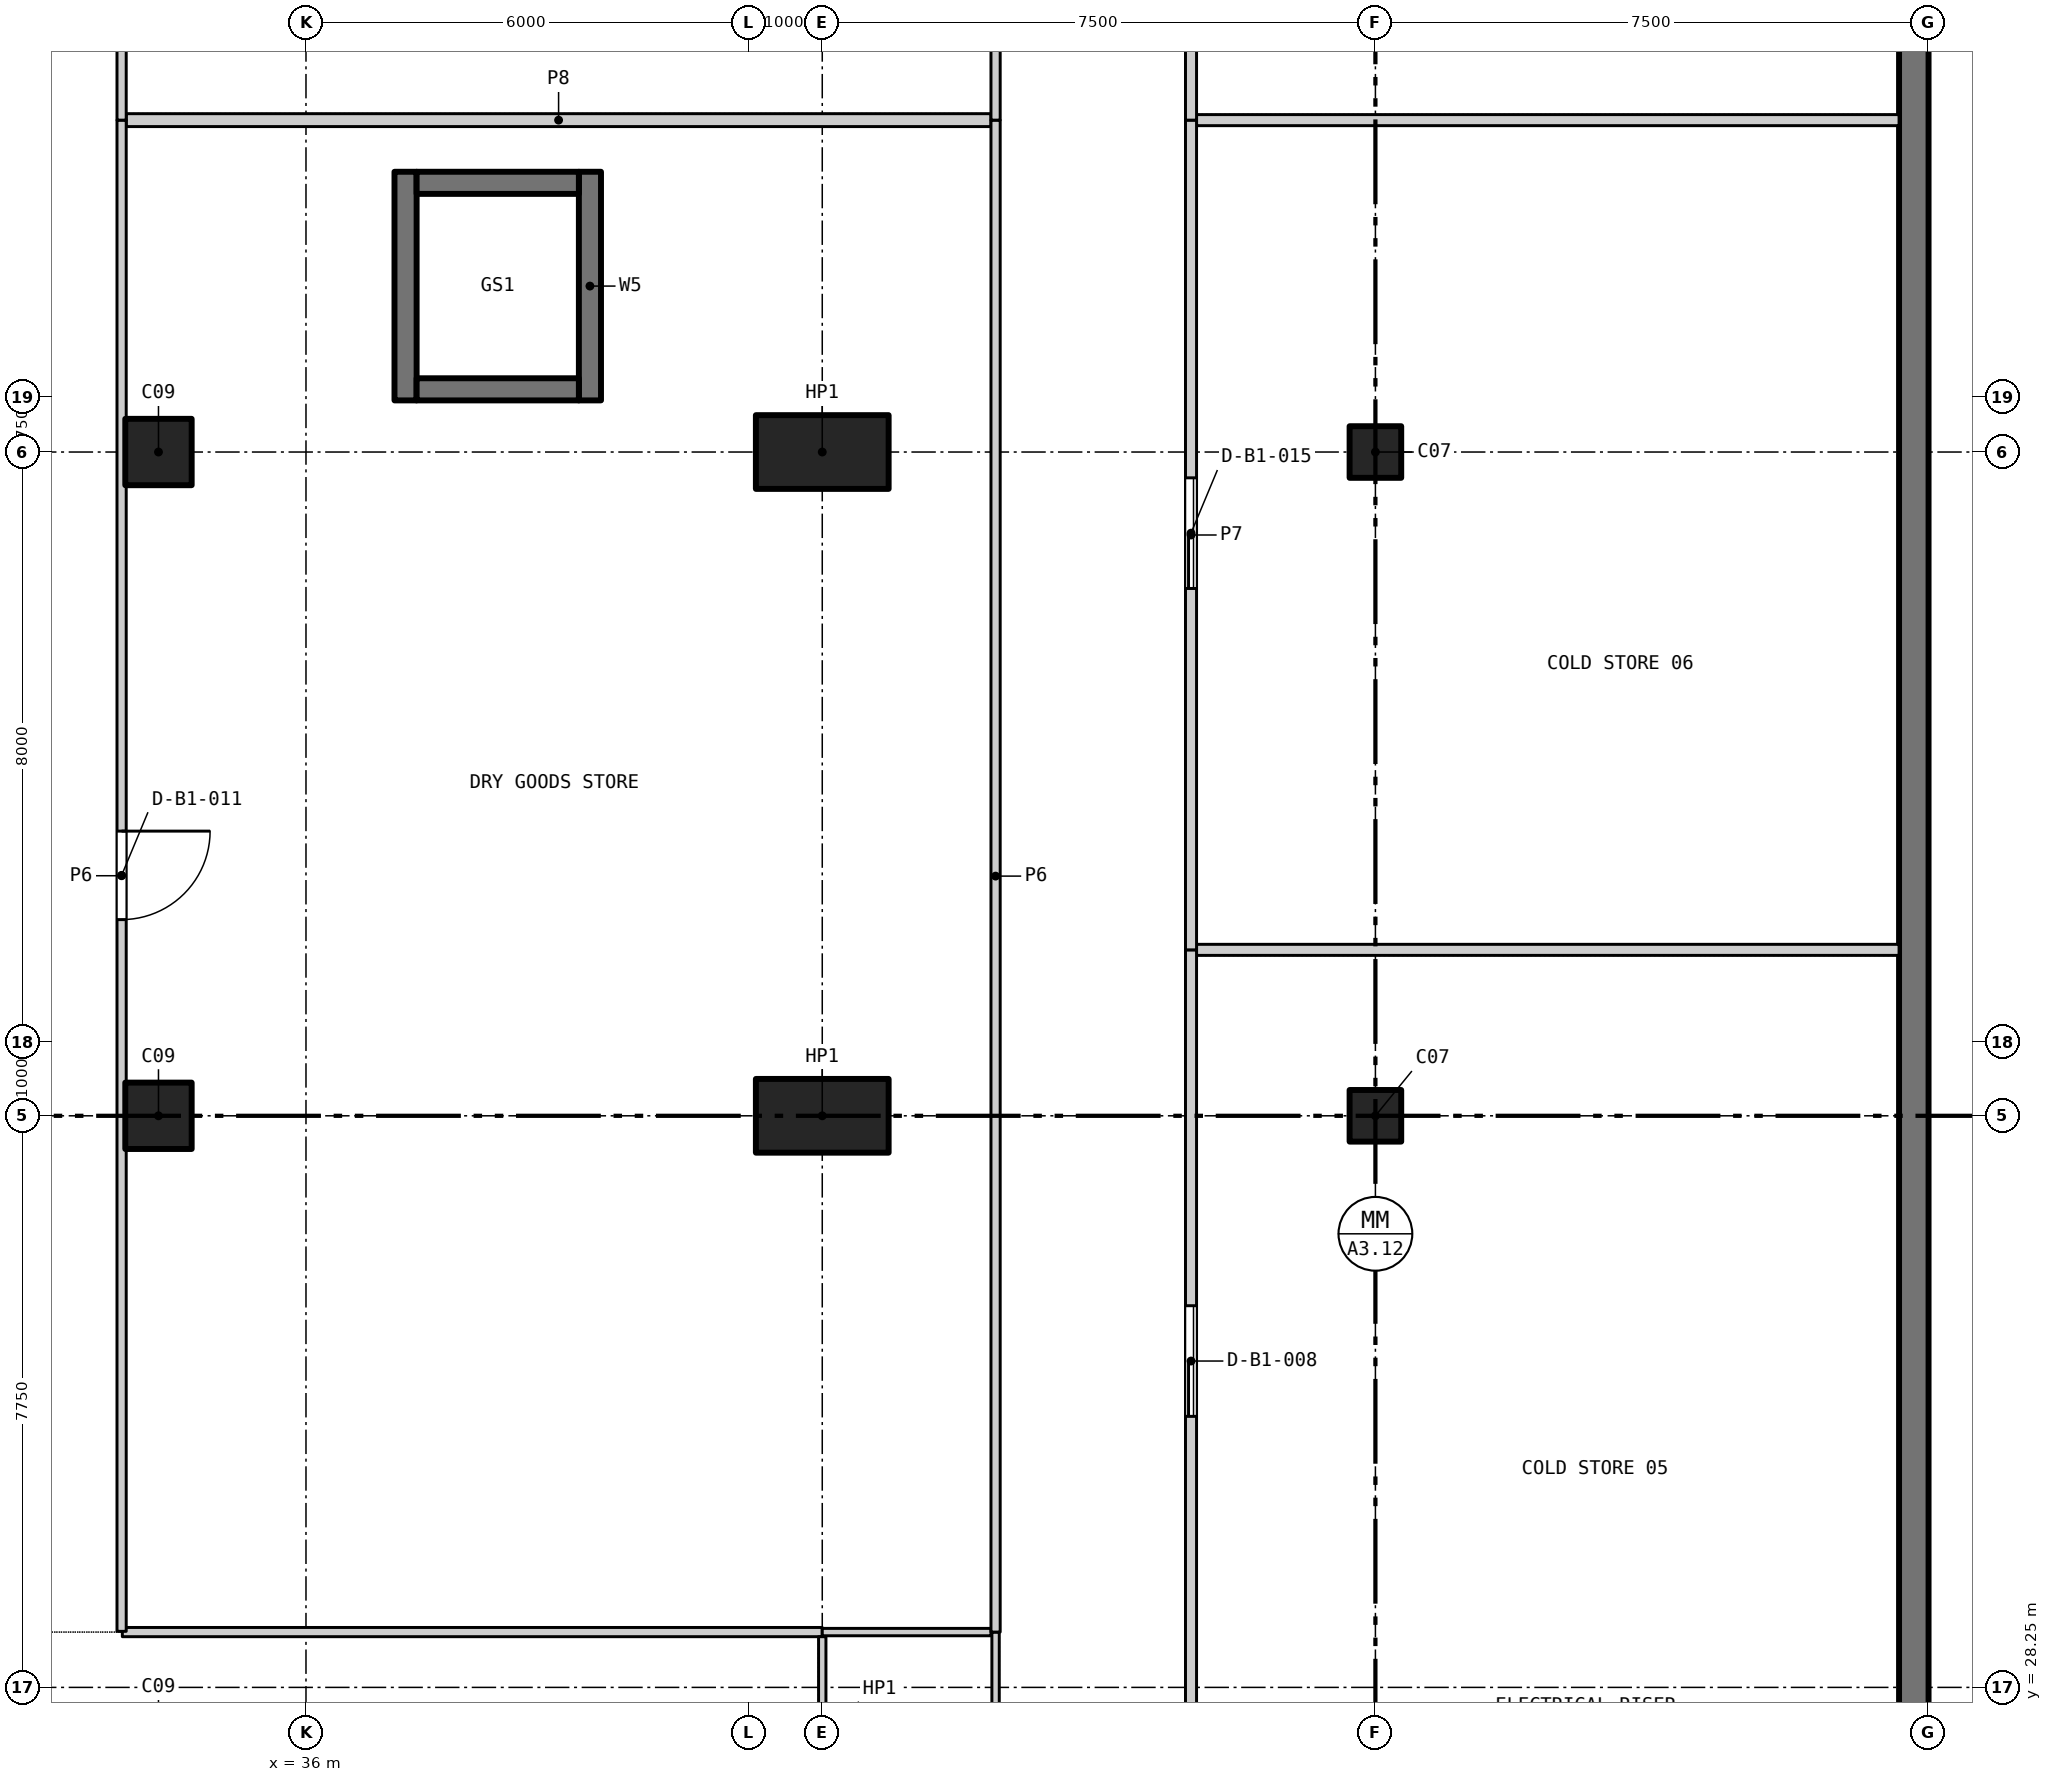
"""IFC4 building model, lengths in metres.
Left out: names, types, materials, properties, quantities, classifications, styles, units other than length and angle.
Written with IfcOpenShell. Run it as: python <this file> out.ifc"""

import sys

from ifc_helpers import new_model, si_unit, direction, frame, frame_2d, origin, origin_2d, place, context, subcontext, project, spatial, rectangle, extrude, element, fill, save


model = new_model("IFC4")
c1 = context("Model", 3, precision=1e-05, world=origin(), true_north=direction((0.0, 1.0)))
c2 = subcontext(c1, "Body", "Model", "MODEL_VIEW")
j1 = project(units=[si_unit("LENGTHUNIT", "METRE"), si_unit("PLANEANGLEUNIT", "RADIAN")], contexts=[c1])
p1 = place(None, origin())
s1 = spatial("IfcSite", under=j1, at=p1, CompositionType="ELEMENT")
p2 = place(p1, origin())
s2 = spatial("IfcBuilding", under=s1, at=p2, CompositionType="ELEMENT")
p3 = place(p2, frame((0.0, 0.0, -10.0)))
s3 = spatial("IfcBuildingStorey", under=s2, at=p3, CompositionType="ELEMENT", Elevation=-10.0)
for number, where, z_axis, x_axis in (
    (1, (34.0, 36.0, -1.4), (0.0, 0.0, 1.0), (1.0, 0.0, 0.0)),
    (2, (34.0, 45.0, -1.4), (0.0, 0.0, 1.0), (1.0, 0.0, 0.0)),
):
    element("IfcColumn", number, at=place(p3, frame(where, z_axis=z_axis, x_axis=x_axis)), inside=s3, PredefinedType="COLUMN", context=c2, shape_type="SweptSolid", body=[
        extrude(rectangle(XDim=0.9, YDim=0.9, at=origin_2d()), origin(), (0.0, 0.0, 1.0), 6.4),
    ])
for number, where, z_axis, x_axis in (
    (3, (50.5, 36.0, -1.4), (0.0, 0.0, 1.0), (1.0, 0.0, 0.0)),
    (4, (50.5, 45.0, -1.4), (0.0, 0.0, 1.0), (1.0, 0.0, 0.0)),
):
    element("IfcColumn", number, at=place(p3, frame(where, z_axis=z_axis, x_axis=x_axis)), inside=s3, PredefinedType="COLUMN", context=c2, shape_type="SweptSolid", body=[
        extrude(rectangle(XDim=0.7, YDim=0.7, at=origin_2d()), origin(), (0.0, 0.0, 1.0), 6.4),
    ])
p4 = place(p3, frame((57.8, 18.0, -1.4), z_axis=(0.0, 0.0, 1.0), x_axis=(0.0, 1.0, 0.0)))
e5 = element("IfcWall", 5, at=p4, inside=s3, PredefinedType="SOLIDWALL", context=c2, shape_type="SweptSolid", body=[
    extrude(rectangle(XDim=108.0, YDim=0.4, at=frame_2d((54.0, 0.0))), origin(), (0.0, 0.0, 1.0), 6.4),
])
for number, where, z_axis, x_axis in (
    (6, (37.35, 45.7, -1.4), (0.0, 0.0, 1.0), (0.0, 1.0, 0.0)),
    (7, (39.85, 45.7, -1.4), (0.0, 0.0, 1.0), (0.0, 1.0, 0.0)),
):
    element("IfcWall", number, at=place(p3, frame(where, z_axis=z_axis, x_axis=x_axis)), inside=s3, PredefinedType="SHEAR", context=c2, shape_type="SweptSolid", body=[
        extrude(rectangle(XDim=3.1, YDim=0.3, at=frame_2d((1.55, 0.0))), origin(), (0.0, 0.0, 1.0), 6.4),
    ])
for number, where, z_axis, x_axis in (
    (8, (37.5, 45.85, -1.4), (0.0, 0.0, 1.0), (1.0, 0.0, 0.0)),
    (9, (37.5, 48.65, -1.4), (0.0, 0.0, 1.0), (1.0, 0.0, 0.0)),
):
    element("IfcWall", number, at=place(p3, frame(where, z_axis=z_axis, x_axis=x_axis)), inside=s3, PredefinedType="SHEAR", context=c2, shape_type="SweptSolid", body=[
        extrude(rectangle(XDim=2.2, YDim=0.3, at=frame_2d((1.1, 0.0))), origin(), (0.0, 0.0, 1.0), 6.4),
    ])
for number, where, z_axis, x_axis in (
    (10, (43.0, 36.0, -1.4), (0.0, 0.0, 1.0), (1.0, 0.0, 0.0)),
    (11, (43.0, 45.0, -1.4), (0.0, 0.0, 1.0), (1.0, 0.0, 0.0)),
):
    element("IfcColumn", number, at=place(p3, frame(where, z_axis=z_axis, x_axis=x_axis)), inside=s3, PredefinedType="COLUMN", context=c2, shape_type="SweptSolid", body=[
        extrude(rectangle(XDim=1.8, YDim=1.0, at=origin_2d()), origin(), (0.0, 0.0, 1.0), 6.4),
    ])
p5 = place(p3, frame((33.51, 29.0, 0.0), z_axis=(0.0, 0.0, 1.0), x_axis=(1.0, 0.0, 0.0)))
e12 = element("IfcWall", 12, at=p5, inside=s3, PredefinedType="PARTITIONING", context=c2, shape_type="SweptSolid", body=[
    extrude(rectangle(XDim=9.49, YDim=0.125, at=frame_2d((4.745, 0.0))), origin(), (0.0, 0.0, 1.0), 4.75),
])
p6 = place(p3, frame((43.0, 29.0, 0.0), z_axis=(0.0, 0.0, 1.0), x_axis=(1.0, 0.0, 0.0)))
e13 = element("IfcWall", 13, at=p6, inside=s3, PredefinedType="PARTITIONING", context=c2, shape_type="SweptSolid", body=[
    extrude(rectangle(XDim=2.288, YDim=0.1, at=frame_2d((1.144, 0.0))), origin(), (0.0, 0.0, 1.0), 4.75),
])
p7 = place(p3, frame((48.075, 38.25, 0.0), z_axis=(0.0, 0.0, 1.0), x_axis=(1.0, 0.0, 0.0)))
e14 = element("IfcWall", 14, at=p7, inside=s3, PredefinedType="PARTITIONING", context=c2, shape_type="SweptSolid", body=[
    extrude(rectangle(XDim=9.525, YDim=0.15, at=frame_2d((4.763, 0.0))), origin(), (0.0, 0.0, 1.0), 4.75),
])
p8 = place(p3, frame((33.562, 49.5, 0.0), z_axis=(0.0, 0.0, 1.0), x_axis=(1.0, 0.0, 0.0)))
e15 = element("IfcWall", 15, at=p8, inside=s3, PredefinedType="PARTITIONING", context=c2, shape_type="SweptSolid", body=[
    extrude(rectangle(XDim=11.725, YDim=0.175, at=frame_2d((5.863, 0.0))), origin(), (0.0, 0.0, 1.0), 4.75),
])
p9 = place(p3, frame((48.075, 49.5, 0.0), z_axis=(0.0, 0.0, 1.0), x_axis=(1.0, 0.0, 0.0)))
e16 = element("IfcWall", 16, at=p9, inside=s3, PredefinedType="PARTITIONING", context=c2, shape_type="SweptSolid", body=[
    extrude(rectangle(XDim=9.525, YDim=0.15, at=frame_2d((4.763, 0.0))), origin(), (0.0, 0.0, 1.0), 4.75),
])
p10 = place(p3, frame((33.5, 29.01, 0.0), z_axis=(0.0, 0.0, 1.0), x_axis=(0.0, 1.0, 0.0)))
e17 = element("IfcWall", 17, at=p10, inside=s3, PredefinedType="PARTITIONING", context=c2, shape_type="SweptSolid", body=[
    extrude(rectangle(XDim=20.49, YDim=0.125, at=frame_2d((10.245, 0.0))), origin(), (0.0, 0.0, 1.0), 4.75),
])
p11 = place(p10, frame((9.65, 0.0, 0.0)))
e18 = element("IfcOpeningElement", 18, at=p11, cuts=e17, PredefinedType="OPENING", context=c2, shape_type="SweptSolid", body=[
    extrude(rectangle(XDim=1.2, YDim=2.1, at=frame_2d((0.6, 1.05))), frame((0.0, 0.073, 0.0), z_axis=(0.0, -1.0, 0.0), x_axis=(1.0, 0.0, 0.0)), (0.0, 0.0, 1.0), 0.145),
])
p12 = place(p3, frame((33.5, 49.5, 0.0), z_axis=(0.0, 0.0, 1.0), x_axis=(0.0, 1.0, 0.0)))
e19 = element("IfcWall", 19, at=p12, inside=s3, PredefinedType="PARTITIONING", context=c2, shape_type="SweptSolid", body=[
    extrude(rectangle(XDim=18.0, YDim=0.125, at=frame_2d((9.0, 0.0))), origin(), (0.0, 0.0, 1.0), 4.75),
])
p13 = place(p12, frame((8.4, 0.0, 0.0)))
e20 = element("IfcOpeningElement", 20, at=p13, cuts=e19, PredefinedType="OPENING", context=c2, shape_type="SweptSolid", body=[
    extrude(rectangle(XDim=1.2, YDim=2.1, at=frame_2d((0.6, 1.05))), frame((0.0, 0.073, 0.0), z_axis=(0.0, -1.0, 0.0), x_axis=(1.0, 0.0, 0.0)), (0.0, 0.0, 1.0), 0.145),
])
p14 = place(p3, frame((43.0, 27.95, 0.0), z_axis=(0.0, 0.0, 1.0), x_axis=(0.0, 1.0, 0.0)))
e21 = element("IfcWall", 21, at=p14, inside=s3, PredefinedType="PARTITIONING", context=c2, shape_type="SweptSolid", body=[
    extrude(rectangle(XDim=0.988, YDim=0.1, at=frame_2d((0.494, 0.0))), origin(), (0.0, 0.0, 1.0), 4.75),
])
p15 = place(p3, frame((45.35, 27.05, 0.0), z_axis=(0.0, 0.0, 1.0), x_axis=(0.0, 1.0, 0.0)))
e22 = element("IfcWall", 22, at=p15, inside=s3, PredefinedType="PARTITIONING", context=c2, shape_type="SweptSolid", body=[
    extrude(rectangle(XDim=1.95, YDim=0.1, at=frame_2d((0.975, 0.0))), origin(), (0.0, 0.0, 1.0), 4.75),
])
p16 = place(p3, frame((45.35, 29.0, 0.0), z_axis=(0.0, 0.0, 1.0), x_axis=(0.0, 1.0, 0.0)))
e23 = element("IfcWall", 23, at=p16, inside=s3, PredefinedType="PARTITIONING", context=c2, shape_type="SweptSolid", body=[
    extrude(rectangle(XDim=20.5, YDim=0.125, at=frame_2d((10.25, 0.0))), origin(), (0.0, 0.0, 1.0), 4.75),
])
p17 = place(p3, frame((45.35, 49.5, 0.0), z_axis=(0.0, 0.0, 1.0), x_axis=(0.0, 1.0, 0.0)))
e24 = element("IfcWall", 24, at=p17, inside=s3, PredefinedType="PARTITIONING", context=c2, shape_type="SweptSolid", body=[
    extrude(rectangle(XDim=18.0, YDim=0.125, at=frame_2d((9.0, 0.0))), origin(), (0.0, 0.0, 1.0), 4.75),
])
p18 = place(p3, frame((48.0, 27.075, 0.0), z_axis=(0.0, 0.0, 1.0), x_axis=(0.0, 1.0, 0.0)))
e25 = element("IfcWall", 25, at=p18, inside=s3, PredefinedType="PARTITIONING", context=c2, shape_type="SweptSolid", body=[
    extrude(rectangle(XDim=11.175, YDim=0.15, at=frame_2d((5.587, 0.0))), origin(), (0.0, 0.0, 1.0), 4.75),
])
p19 = place(p18, frame((4.85, 0.0, 0.0)))
e26 = element("IfcOpeningElement", 26, at=p19, cuts=e25, PredefinedType="OPENING", context=c2, shape_type="SweptSolid", body=[
    extrude(rectangle(XDim=1.5, YDim=2.4, at=frame_2d((0.75, 1.2))), frame((0.0, 0.085, 0.0), z_axis=(0.0, -1.0, 0.0), x_axis=(1.0, 0.0, 0.0)), (0.0, 0.0, 1.0), 0.17),
])
p20 = place(p3, frame((48.0, 38.25, 0.0), z_axis=(0.0, 0.0, 1.0), x_axis=(0.0, 1.0, 0.0)))
e27 = element("IfcWall", 27, at=p20, inside=s3, PredefinedType="PARTITIONING", context=c2, shape_type="SweptSolid", body=[
    extrude(rectangle(XDim=11.25, YDim=0.15, at=frame_2d((5.625, 0.0))), origin(), (0.0, 0.0, 1.0), 4.75),
])
p21 = place(p20, frame((4.9, 0.0, 0.0)))
e28 = element("IfcOpeningElement", 28, at=p21, cuts=e27, PredefinedType="OPENING", context=c2, shape_type="SweptSolid", body=[
    extrude(rectangle(XDim=1.5, YDim=2.4, at=frame_2d((0.75, 1.2))), frame((0.0, 0.085, 0.0), z_axis=(0.0, -1.0, 0.0), x_axis=(1.0, 0.0, 0.0)), (0.0, 0.0, 1.0), 0.17),
])
p22 = place(p3, frame((48.0, 49.5, 0.0), z_axis=(0.0, 0.0, 1.0), x_axis=(0.0, 1.0, 0.0)))
e29 = element("IfcWall", 29, at=p22, inside=s3, PredefinedType="PARTITIONING", context=c2, shape_type="SweptSolid", body=[
    extrude(rectangle(XDim=11.25, YDim=0.15, at=frame_2d((5.625, 0.0))), origin(), (0.0, 0.0, 1.0), 4.75),
])
p23 = place(p22, frame((4.9, 0.0, 0.0)))
e30 = element("IfcOpeningElement", 30, at=p23, cuts=e29, PredefinedType="OPENING", context=c2, shape_type="SweptSolid", body=[
    extrude(rectangle(XDim=1.5, YDim=2.4, at=frame_2d((0.75, 1.2))), frame((0.0, 0.085, 0.0), z_axis=(0.0, -1.0, 0.0), x_axis=(1.0, 0.0, 0.0)), (0.0, 0.0, 1.0), 0.17),
])
p24 = place(p19, origin())
e31 = element("IfcDoor", 31, at=p24, inside=s3, OperationType="SLIDING_TO_LEFT", PredefinedType="DOOR", context=c2, shape_type="SweptSolid", body=[
    extrude(rectangle(XDim=1.5, YDim=2.4, at=frame_2d((0.75, 1.2))), frame((0.0, 0.025, 0.0), z_axis=(0.0, -1.0, 0.0), x_axis=(1.0, 0.0, 0.0)), (0.0, 0.0, 1.0), 0.05),
])
fill(e26, e31)
p25 = place(p11, frame((1.2, 0.0, 0.0), z_axis=(0.0, 0.0, 1.0), x_axis=(-1.0, 0.0, 0.0)))
e32 = element("IfcDoor", 32, at=p25, inside=s3, OperationType="SINGLE_SWING_LEFT", PredefinedType="DOOR", context=c2, shape_type="SweptSolid", body=[
    extrude(rectangle(XDim=1.2, YDim=2.1, at=frame_2d((0.6, 1.05))), frame((0.0, 0.025, 0.0), z_axis=(0.0, -1.0, 0.0), x_axis=(1.0, 0.0, 0.0)), (0.0, 0.0, 1.0), 0.05),
])
fill(e18, e32)
p26 = place(p21, origin())
e33 = element("IfcDoor", 33, at=p26, inside=s3, OperationType="SLIDING_TO_LEFT", PredefinedType="DOOR", context=c2, shape_type="SweptSolid", body=[
    extrude(rectangle(XDim=1.5, YDim=2.4, at=frame_2d((0.75, 1.2))), frame((0.0, 0.025, 0.0), z_axis=(0.0, -1.0, 0.0), x_axis=(1.0, 0.0, 0.0)), (0.0, 0.0, 1.0), 0.05),
])
fill(e28, e33)
save(model, sys.argv[1])
